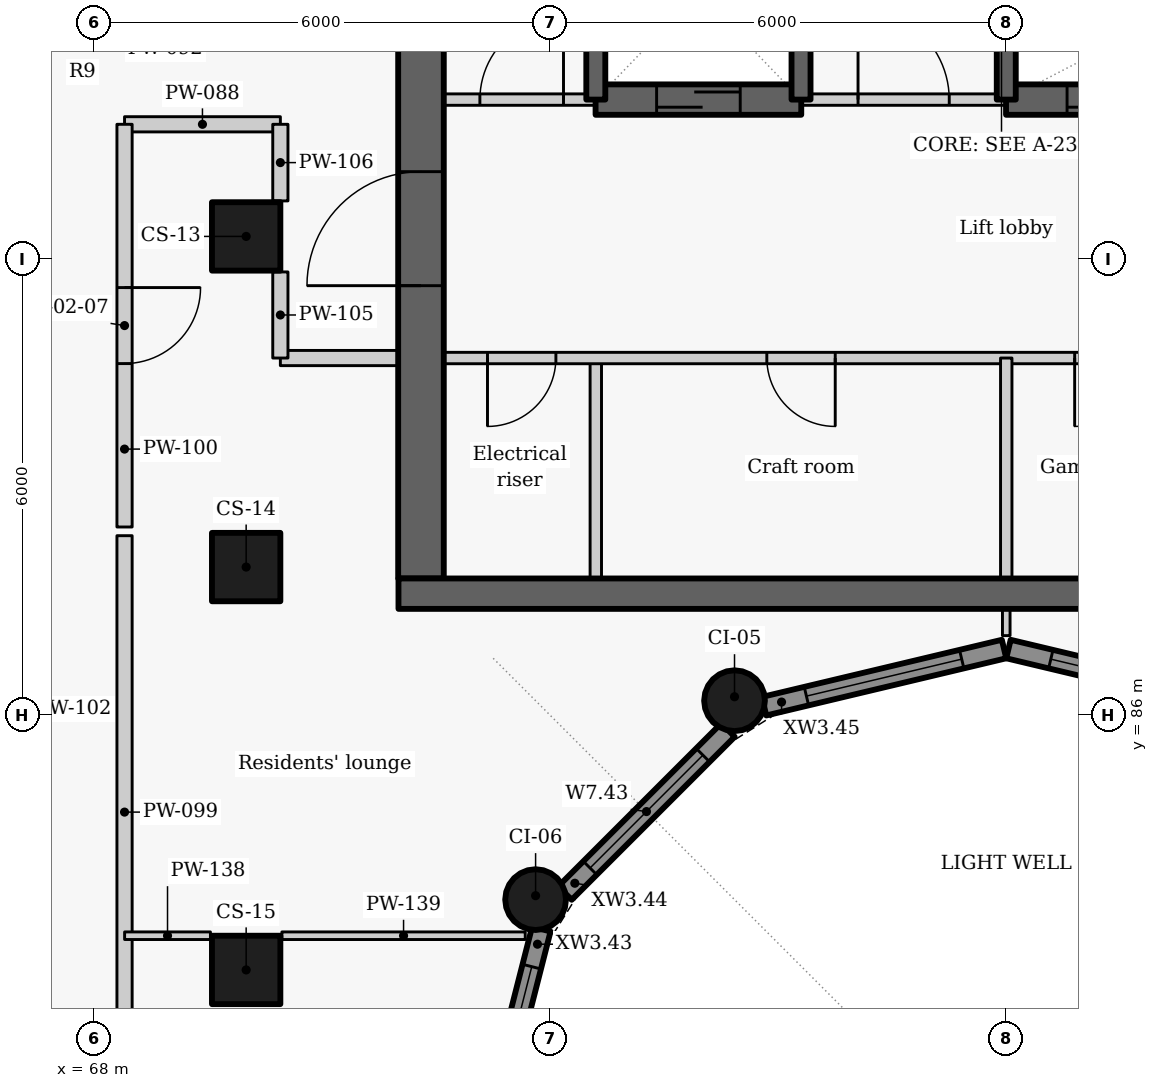
"""IFC4 building model, lengths in metres.
Left out: names, types, materials, properties, quantities, classifications, styles, units other than length and angle.
Written with IfcOpenShell. Run it as: python <this file> out.ifc"""

import sys

from ifc_helpers import new_model, si_unit, direction, frame, frame_2d, origin, origin_2d, place, context, subcontext, project, spatial, rectangle, circle, extrude, element, fill, save


model = new_model("IFC4")
c1 = context("Model", 3, precision=1e-05, world=origin(), true_north=direction((0.0, 1.0)))
c2 = subcontext(c1, "Body", "Model", "MODEL_VIEW")
j1 = project(units=[si_unit("LENGTHUNIT", "METRE"), si_unit("PLANEANGLEUNIT", "RADIAN")], contexts=[c1])
p1 = place(None, origin())
s1 = spatial("IfcSite", under=j1, at=p1, CompositionType="ELEMENT")
p2 = place(p1, origin())
s2 = spatial("IfcBuilding", under=s1, at=p2, CompositionType="ELEMENT")
p3 = place(p2, frame((0.0, 0.0, 193.2)))
s3 = spatial("IfcBuildingStorey", under=s2, at=p3, CompositionType="ELEMENT", Elevation=193.2)
for number, where, z_axis, x_axis in (
    (1, (70.0, 92.3, 0.0), (0.0, 0.0, 1.0), (0.0, -1.0, 0.0)),
    (2, (70.0, 87.95, 0.0), (0.0, 0.0, 1.0), (0.0, -1.0, 0.0)),
    (3, (70.0, 82.65, 0.0), (0.0, 0.0, 1.0), (0.0, -1.0, 0.0)),
):
    element("IfcColumn", number, at=place(p3, frame(where, z_axis=z_axis, x_axis=x_axis)), inside=s3, PredefinedType="COLUMN", context=c2, shape_type="SweptSolid", body=[
        extrude(rectangle(XDim=0.9, YDim=0.9, at=origin_2d()), origin(), (0.0, 0.0, 1.0), 3.3),
    ])
for number, where, z_axis, x_axis in (
    (4, (76.425, 86.192, 0.0), (0.0, 0.0, 1.0), (-0.866, -0.5, 0.0)),
    (5, (73.808, 83.575, 0.0), (0.0, 0.0, 1.0), (-0.5, -0.866, 0.0)),
):
    element("IfcColumn", number, at=place(p3, frame(where, z_axis=z_axis, x_axis=x_axis)), inside=s3, PredefinedType="COLUMN", context=c2, shape_type="SweptSolid", body=[
        extrude(circle(Radius=0.4, at=origin_2d()), origin(), (0.0, 0.0, 1.0), 3.3),
    ])
p4 = place(p3, frame((73.14, 80.27, 0.0), z_axis=(0.0, 0.0, 1.0), x_axis=(0.247055971283, 0.969001211069, 0.0)))
e6 = element("IfcWall", 6, at=p4, inside=s3, PredefinedType="SOLIDWALL", context=c2, shape_type="SweptSolid", body=[
    extrude(rectangle(XDim=3.01, YDim=0.25, at=frame_2d((1.505, 0.0))), origin(), (0.0, 0.0, 1.0), 2.425),
])
p5 = place(p4, frame((0.401, 0.0, 0.9)))
e7 = element("IfcOpeningElement", 7, at=p5, cuts=e6, PredefinedType="OPENING", context=c2, shape_type="SweptSolid", body=[
    extrude(rectangle(XDim=2.1, YDim=1.1, at=frame_2d((1.05, 0.55))), frame((0.0, 0.135, 0.0), z_axis=(0.0, -1.0, 0.0), x_axis=(1.0, 0.0, 0.0)), (0.0, 0.0, 1.0), 0.27),
])
p6 = place(p3, frame((74.194, 83.661, 0.0), z_axis=(0.0, 0.0, 1.0), x_axis=(0.707106781187, 0.707106781187, 0.0)))
e8 = element("IfcWall", 8, at=p6, inside=s3, PredefinedType="SOLIDWALL", context=c2, shape_type="SweptSolid", body=[
    extrude(rectangle(XDim=3.033, YDim=0.25, at=frame_2d((1.517, 0.0))), origin(), (0.0, 0.0, 1.0), 2.425),
])
p7 = place(p6, frame((0.467, 0.0, 0.9)))
e9 = element("IfcOpeningElement", 9, at=p7, cuts=e8, PredefinedType="OPENING", context=c2, shape_type="SweptSolid", body=[
    extrude(rectangle(XDim=2.1, YDim=1.1, at=frame_2d((1.05, 0.55))), frame((0.0, 0.135, 0.0), z_axis=(0.0, -1.0, 0.0), x_axis=(1.0, 0.0, 0.0)), (0.0, 0.0, 1.0), 0.27),
])
p8 = place(p3, frame((76.814, 86.119, 0.0), z_axis=(0.0, 0.0, 1.0), x_axis=(0.972773113459, 0.231759508395, 0.0)))
e10 = element("IfcWall", 10, at=p8, inside=s3, PredefinedType="SOLIDWALL", context=c2, shape_type="SweptSolid", body=[
    extrude(rectangle(XDim=3.246, YDim=0.25, at=frame_2d((1.623, 0.0))), origin(), (0.0, 0.0, 1.0), 2.425),
])
p9 = place(p8, frame((0.573, 0.0, 0.9)))
e11 = element("IfcOpeningElement", 11, at=p9, cuts=e10, PredefinedType="OPENING", context=c2, shape_type="SweptSolid", body=[
    extrude(rectangle(XDim=2.1, YDim=1.1, at=frame_2d((1.05, 0.55))), frame((0.0, 0.135, 0.0), z_axis=(0.0, -1.0, 0.0), x_axis=(1.0, 0.0, 0.0)), (0.0, 0.0, 1.0), 0.27),
])
p10 = place(p3, frame((80.029, 86.872, 0.0), z_axis=(0.0, 0.0, 1.0), x_axis=(0.972773113459, -0.231759508395, 0.0)))
e12 = element("IfcWall", 12, at=p10, inside=s3, PredefinedType="SOLIDWALL", context=c2, shape_type="SweptSolid", body=[
    extrude(rectangle(XDim=3.246, YDim=0.25, at=frame_2d((1.623, 0.0))), origin(), (0.0, 0.0, 1.0), 2.425),
])
p11 = place(p10, frame((0.573, 0.0, 0.9)))
e13 = element("IfcOpeningElement", 13, at=p11, cuts=e12, PredefinedType="OPENING", context=c2, shape_type="SweptSolid", body=[
    extrude(rectangle(XDim=2.1, YDim=1.1, at=frame_2d((1.05, 0.55))), frame((0.0, 0.135, 0.0), z_axis=(0.0, -1.0, 0.0), x_axis=(1.0, 0.0, 0.0)), (0.0, 0.0, 1.0), 0.27),
])
p12 = place(p3, frame((74.6, 87.8, 0.0), z_axis=(0.0, 0.0, 1.0), x_axis=(0.0, 1.0, 0.0)))
e14 = element("IfcWall", 14, at=p12, inside=s3, PredefinedType="PARTITIONING", context=c2, shape_type="SweptSolid", body=[
    extrude(rectangle(XDim=2.9, YDim=0.15, at=frame_2d((1.45, 0.0))), origin(), (0.0, 0.0, 1.0), 3.025),
])
p13 = place(p3, frame((85.4, 90.7, 0.0), z_axis=(0.0, 0.0, 1.0), x_axis=(-1.0, 0.0, 0.0)))
e15 = element("IfcWall", 15, at=p13, inside=s3, PredefinedType="PARTITIONING", context=c2, shape_type="SweptSolid", body=[
    extrude(rectangle(XDim=13.4, YDim=0.15, at=frame_2d((6.7, 0.0))), origin(), (0.0, 0.0, 1.0), 3.025),
])
p14 = place(p13, frame((11.325, 0.0, 0.0)))
e16 = element("IfcOpeningElement", 16, at=p14, cuts=e15, PredefinedType="OPENING", context=c2, shape_type="SweptSolid", body=[
    extrude(rectangle(XDim=0.9, YDim=2.1, at=frame_2d((0.45, 1.05))), frame((0.0, 0.085, 0.0), z_axis=(0.0, -1.0, 0.0), x_axis=(1.0, 0.0, 0.0)), (0.0, 0.0, 1.0), 0.17),
])
p15 = place(p13, frame((7.65, 0.0, 0.0)))
e17 = element("IfcOpeningElement", 17, at=p15, cuts=e15, PredefinedType="OPENING", context=c2, shape_type="SweptSolid", body=[
    extrude(rectangle(XDim=0.9, YDim=2.1, at=frame_2d((0.45, 1.05))), frame((0.0, 0.085, 0.0), z_axis=(0.0, -1.0, 0.0), x_axis=(1.0, 0.0, 0.0)), (0.0, 0.0, 1.0), 0.17),
])
p16 = place(p13, frame((3.6, 0.0, 0.0)))
e18 = element("IfcOpeningElement", 18, at=p16, cuts=e15, PredefinedType="OPENING", context=c2, shape_type="SweptSolid", body=[
    extrude(rectangle(XDim=0.9, YDim=2.1, at=frame_2d((0.45, 1.05))), frame((0.0, 0.085, 0.0), z_axis=(0.0, -1.0, 0.0), x_axis=(1.0, 0.0, 0.0)), (0.0, 0.0, 1.0), 0.17),
])
p17 = place(p13, frame((0.9, 0.0, 0.0)))
e19 = element("IfcOpeningElement", 19, at=p17, cuts=e15, PredefinedType="OPENING", context=c2, shape_type="SweptSolid", body=[
    extrude(rectangle(XDim=0.9, YDim=2.1, at=frame_2d((0.45, 1.05))), frame((0.0, 0.085, 0.0), z_axis=(0.0, -1.0, 0.0), x_axis=(1.0, 0.0, 0.0)), (0.0, 0.0, 1.0), 0.17),
])
p18 = place(p3, frame((72.3, 87.8, -0.275), z_axis=(0.0, 0.0, 1.0), x_axis=(0.0, 1.0, 0.0)))
e20 = element("IfcWall", 20, at=p18, inside=s3, PredefinedType="SHEAR", context=c2, shape_type="SweptSolid", body=[
    extrude(rectangle(XDim=9.1, YDim=0.6, at=frame_2d((4.55, 0.0))), origin(), (0.0, 0.0, 1.0), 3.3),
])
p19 = place(p18, frame((3.852, 0.0, 0.275)))
e21 = element("IfcOpeningElement", 21, at=p19, cuts=e20, PredefinedType="OPENING", context=c2, shape_type="SweptSolid", body=[
    extrude(rectangle(XDim=1.5, YDim=2.1, at=frame_2d((0.75, 1.05))), frame((0.0, 0.31, 0.0), z_axis=(0.0, -1.0, 0.0), x_axis=(1.0, 0.0, 0.0)), (0.0, 0.0, 1.0), 0.62),
])
p20 = place(p3, frame((80.0, 87.8, 0.0), z_axis=(0.0, 0.0, 1.0), x_axis=(0.0, 1.0, 0.0)))
e22 = element("IfcWall", 22, at=p20, inside=s3, PredefinedType="PARTITIONING", context=c2, shape_type="SweptSolid", body=[
    extrude(rectangle(XDim=2.9, YDim=0.15, at=frame_2d((1.45, 0.0))), origin(), (0.0, 0.0, 1.0), 3.025),
])
p21 = place(p3, frame((72.0, 94.1, 0.0), z_axis=(0.0, 0.0, 1.0), x_axis=(1.0, 0.0, 0.0)))
e23 = element("IfcWall", 23, at=p21, inside=s3, PredefinedType="PARTITIONING", context=c2, shape_type="SweptSolid", body=[
    extrude(rectangle(XDim=2.603, YDim=0.15, at=frame_2d((1.302, 0.0))), origin(), (0.0, 0.0, 1.0), 3.025),
])
p22 = place(p21, frame((1.075, 0.0, 0.0)))
e24 = element("IfcOpeningElement", 24, at=p22, cuts=e23, PredefinedType="OPENING", context=c2, shape_type="SweptSolid", body=[
    extrude(rectangle(XDim=1.1, YDim=2.1, at=frame_2d((0.55, 1.05))), frame((0.0, 0.085, 0.0), z_axis=(0.0, -1.0, 0.0), x_axis=(1.0, 0.0, 0.0)), (0.0, 0.0, 1.0), 0.17),
])
p23 = place(p3, frame((77.297, 94.1, 0.0), z_axis=(0.0, 0.0, 1.0), x_axis=(1.0, 0.0, 0.0)))
e25 = element("IfcWall", 25, at=p23, inside=s3, PredefinedType="PARTITIONING", context=c2, shape_type="SweptSolid", body=[
    extrude(rectangle(XDim=2.706, YDim=0.15, at=frame_2d((1.353, 0.0))), origin(), (0.0, 0.0, 1.0), 3.025),
])
p24 = place(p23, frame((0.753, 0.0, 0.0)))
e26 = element("IfcOpeningElement", 26, at=p24, cuts=e25, PredefinedType="OPENING", context=c2, shape_type="SweptSolid", body=[
    extrude(rectangle(XDim=1.2, YDim=2.1, at=frame_2d((0.6, 1.05))), frame((0.0, 0.085, 0.0), z_axis=(0.0, -1.0, 0.0), x_axis=(1.0, 0.0, 0.0)), (0.0, 0.0, 1.0), 0.17),
])
p25 = place(p3, frame((74.597, 94.1, -0.275), z_axis=(0.0, 0.0, 1.0), x_axis=(1.0, 0.0, 0.0)))
e27 = element("IfcWall", 27, at=p25, inside=s3, PredefinedType="SHEAR", context=c2, shape_type="SweptSolid", body=[
    extrude(rectangle(XDim=2.706, YDim=0.4, at=frame_2d((1.353, 0.0))), origin(), (0.0, 0.0, 1.0), 3.3),
])
p26 = place(p25, frame((0.803, 0.0, 0.275)))
e28 = element("IfcOpeningElement", 28, at=p26, cuts=e27, PredefinedType="OPENING", context=c2, shape_type="SweptSolid", body=[
    extrude(rectangle(XDim=1.1, YDim=2.1, at=frame_2d((0.55, 1.05))), frame((0.0, 0.21, 0.0), z_axis=(0.0, -1.0, 0.0), x_axis=(1.0, 0.0, 0.0)), (0.0, 0.0, 1.0), 0.42),
])
p27 = place(p3, frame((79.997, 94.1, -0.275), z_axis=(0.0, 0.0, 1.0), x_axis=(1.0, 0.0, 0.0)))
e29 = element("IfcWall", 29, at=p27, inside=s3, PredefinedType="SHEAR", context=c2, shape_type="SweptSolid", body=[
    extrude(rectangle(XDim=5.406, YDim=0.4, at=frame_2d((2.703, 0.0))), origin(), (0.0, 0.0, 1.0), 3.3),
])
p28 = place(p27, frame((0.803, 0.0, 0.275)))
e30 = element("IfcOpeningElement", 30, at=p28, cuts=e29, PredefinedType="OPENING", context=c2, shape_type="SweptSolid", body=[
    extrude(rectangle(XDim=1.1, YDim=2.1, at=frame_2d((0.55, 1.05))), frame((0.0, 0.21, 0.0), z_axis=(0.0, -1.0, 0.0), x_axis=(1.0, 0.0, 0.0)), (0.0, 0.0, 1.0), 0.42),
])
for number, where, z_axis, x_axis in (
    (31, (74.6, 94.1, -0.275), (0.0, 0.0, 1.0), (0.0, 1.0, 0.0)),
    (32, (77.3, 94.1, -0.275), (0.0, 0.0, 1.0), (0.0, 1.0, 0.0)),
    (33, (80.0, 94.1, -0.275), (0.0, 0.0, 1.0), (0.0, 1.0, 0.0)),
):
    element("IfcWall", number, at=place(p3, frame(where, z_axis=z_axis, x_axis=x_axis)), inside=s3, PredefinedType="SHEAR", context=c2, shape_type="SweptSolid", body=[
        extrude(rectangle(XDim=2.8, YDim=0.25, at=frame_2d((1.4, 0.0))), origin(), (0.0, 0.0, 1.0), 3.3),
    ])
p29 = place(p3, frame((68.4, 93.775, 0.0), z_axis=(0.0, 0.0, 1.0), x_axis=(1.0, 0.0, 0.0)))
e34 = element("IfcWall", 34, at=p29, inside=s3, PredefinedType="PARTITIONING", context=c2, shape_type="SweptSolid", body=[
    extrude(rectangle(XDim=2.05, YDim=0.2, at=frame_2d((1.025, 0.0))), origin(), (0.0, 0.0, 1.0), 2.505),
])
p30 = place(p3, frame((70.45, 90.7, 0.0), z_axis=(0.0, 0.0, 1.0), x_axis=(1.0, 0.0, 0.0)))
e35 = element("IfcWall", 35, at=p30, inside=s3, PredefinedType="PARTITIONING", context=c2, shape_type="SweptSolid", body=[
    extrude(rectangle(XDim=1.55, YDim=0.2, at=frame_2d((0.775, 0.0))), origin(), (0.0, 0.0, 1.0), 3.025),
])
p31 = place(p3, frame((68.4, 88.363, 0.0), z_axis=(0.0, 0.0, 1.0), x_axis=(0.0, -1.0, 0.0)))
e36 = element("IfcWall", 36, at=p31, inside=s3, PredefinedType="PARTITIONING", context=c2, shape_type="SweptSolid", body=[
    extrude(rectangle(XDim=10.486, YDim=0.2, at=frame_2d((5.243, 0.0))), origin(), (0.0, 0.0, 1.0), 3.025),
])
p32 = place(p31, frame((7.373, 0.0, 0.0)))
e37 = element("IfcOpeningElement", 37, at=p32, cuts=e36, PredefinedType="OPENING", context=c2, shape_type="SweptSolid", body=[
    extrude(rectangle(XDim=1.0, YDim=2.1, at=frame_2d((0.5, 1.05))), frame((0.0, 0.11, 0.0), z_axis=(0.0, -1.0, 0.0), x_axis=(1.0, 0.0, 0.0)), (0.0, 0.0, 1.0), 0.22),
])
p33 = place(p3, frame((68.4, 93.775, 0.0), z_axis=(0.0, 0.0, 1.0), x_axis=(0.0, -1.0, 0.0)))
e38 = element("IfcWall", 38, at=p33, inside=s3, PredefinedType="PARTITIONING", context=c2, shape_type="SweptSolid", body=[
    extrude(rectangle(XDim=5.298, YDim=0.2, at=frame_2d((2.649, 0.0))), origin(), (0.0, 0.0, 1.0), 3.025),
])
p34 = place(p33, frame((2.148, 0.0, 0.0)))
e39 = element("IfcOpeningElement", 39, at=p34, cuts=e38, PredefinedType="OPENING", context=c2, shape_type="SweptSolid", body=[
    extrude(rectangle(XDim=1.0, YDim=2.1, at=frame_2d((0.5, 1.05))), frame((0.0, 0.11, 0.0), z_axis=(0.0, -1.0, 0.0), x_axis=(1.0, 0.0, 0.0)), (0.0, 0.0, 1.0), 0.22),
])
p35 = place(p3, frame((70.45, 90.7, 0.0), z_axis=(0.0, 0.0, 1.0), x_axis=(0.0, 1.0, 0.0)))
e40 = element("IfcWall", 40, at=p35, inside=s3, PredefinedType="PARTITIONING", context=c2, shape_type="SweptSolid", body=[
    extrude(rectangle(XDim=1.133, YDim=0.2, at=frame_2d((0.566, 0.0))), origin(), (0.0, 0.0, 1.0), 3.025),
])
p36 = place(p3, frame((70.45, 92.767, 0.0), z_axis=(0.0, 0.0, 1.0), x_axis=(0.0, 1.0, 0.0)))
e41 = element("IfcWall", 41, at=p36, inside=s3, PredefinedType="PARTITIONING", context=c2, shape_type="SweptSolid", body=[
    extrude(rectangle(XDim=1.008, YDim=0.2, at=frame_2d((0.504, 0.0))), origin(), (0.0, 0.0, 1.0), 3.025),
])
p37 = place(p3, frame((80.0, 87.048, 0.0), z_axis=(0.0, 0.0, 1.0), x_axis=(0.0, 1.0, 0.0)))
e42 = element("IfcWall", 42, at=p37, inside=s3, PredefinedType="PARTITIONING", context=c2, shape_type="SweptSolid", body=[
    extrude(rectangle(XDim=0.352, YDim=0.1, at=frame_2d((0.176, 0.0))), origin(), (0.0, 0.0, 1.0), 3.025),
])
p38 = place(p3, frame((68.401, 83.1, 0.0), z_axis=(0.0, 0.0, 1.0), x_axis=(1.0, 0.0, 0.0)))
e43 = element("IfcWall", 43, at=p38, inside=s3, PredefinedType="PARTITIONING", context=c2, shape_type="SweptSolid", body=[
    extrude(rectangle(XDim=1.129, YDim=0.1, at=frame_2d((0.564, 0.0))), origin(), (0.0, 0.0, 1.0), 3.025),
])
p39 = place(p3, frame((70.47, 83.1, 0.0), z_axis=(0.0, 0.0, 1.0), x_axis=(1.0, 0.0, 0.0)))
e44 = element("IfcWall", 44, at=p39, inside=s3, PredefinedType="PARTITIONING", context=c2, shape_type="SweptSolid", body=[
    extrude(rectangle(XDim=3.202, YDim=0.1, at=frame_2d((1.601, 0.0))), origin(), (0.0, 0.0, 1.0), 3.025),
])
p40 = place(p3, frame((72.004, 87.6, -0.275), z_axis=(0.0, 0.0, 1.0), x_axis=(1.0, 0.0, 0.0)))
e45 = element("IfcWall", 45, at=p40, inside=s3, PredefinedType="SHEAR", context=c2, shape_type="SweptSolid", body=[
    extrude(rectangle(XDim=15.992, YDim=0.4, at=frame_2d((7.996, 0.0))), origin(), (0.0, 0.0, 1.0), 3.3),
])
p41 = place(p5, origin())
e46 = element("IfcWindow", 46, at=p41, inside=s3, PartitioningType="SINGLE_PANEL", PredefinedType="WINDOW", context=c2, shape_type="SweptSolid", body=[
    extrude(rectangle(XDim=2.1, YDim=1.1, at=frame_2d((1.05, 0.55))), frame((0.0, 0.03, 0.0), z_axis=(0.0, -1.0, 0.0), x_axis=(1.0, 0.0, 0.0)), (0.0, 0.0, 1.0), 0.06),
])
fill(e7, e46)
p42 = place(p7, origin())
e47 = element("IfcWindow", 47, at=p42, inside=s3, PartitioningType="SINGLE_PANEL", PredefinedType="WINDOW", context=c2, shape_type="SweptSolid", body=[
    extrude(rectangle(XDim=2.1, YDim=1.1, at=frame_2d((1.05, 0.55))), frame((0.0, 0.03, 0.0), z_axis=(0.0, -1.0, 0.0), x_axis=(1.0, 0.0, 0.0)), (0.0, 0.0, 1.0), 0.06),
])
fill(e9, e47)
p43 = place(p9, origin())
e48 = element("IfcWindow", 48, at=p43, inside=s3, PartitioningType="SINGLE_PANEL", PredefinedType="WINDOW", context=c2, shape_type="SweptSolid", body=[
    extrude(rectangle(XDim=2.1, YDim=1.1, at=frame_2d((1.05, 0.55))), frame((0.0, 0.03, 0.0), z_axis=(0.0, -1.0, 0.0), x_axis=(1.0, 0.0, 0.0)), (0.0, 0.0, 1.0), 0.06),
])
fill(e11, e48)
p44 = place(p11, origin())
e49 = element("IfcWindow", 49, at=p44, inside=s3, PartitioningType="SINGLE_PANEL", PredefinedType="WINDOW", context=c2, shape_type="SweptSolid", body=[
    extrude(rectangle(XDim=2.1, YDim=1.1, at=frame_2d((1.05, 0.55))), frame((0.0, 0.03, 0.0), z_axis=(0.0, -1.0, 0.0), x_axis=(1.0, 0.0, 0.0)), (0.0, 0.0, 1.0), 0.06),
])
fill(e13, e49)
p45 = place(p14, origin())
e50 = element("IfcDoor", 50, at=p45, inside=s3, OperationType="SINGLE_SWING_RIGHT", PredefinedType="DOOR", context=c2, shape_type="SweptSolid", body=[
    extrude(rectangle(XDim=0.9, YDim=2.1, at=frame_2d((0.45, 1.05))), frame((0.0, 0.025, 0.0), z_axis=(0.0, -1.0, 0.0), x_axis=(1.0, 0.0, 0.0)), (0.0, 0.0, 1.0), 0.05),
])
fill(e16, e50)
p46 = place(p15, origin())
e51 = element("IfcDoor", 51, at=p46, inside=s3, OperationType="SINGLE_SWING_LEFT", PredefinedType="DOOR", context=c2, shape_type="SweptSolid", body=[
    extrude(rectangle(XDim=0.9, YDim=2.1, at=frame_2d((0.45, 1.05))), frame((0.0, 0.025, 0.0), z_axis=(0.0, -1.0, 0.0), x_axis=(1.0, 0.0, 0.0)), (0.0, 0.0, 1.0), 0.05),
])
fill(e17, e51)
p47 = place(p16, origin())
e52 = element("IfcDoor", 52, at=p47, inside=s3, OperationType="SINGLE_SWING_RIGHT", PredefinedType="DOOR", context=c2, shape_type="SweptSolid", body=[
    extrude(rectangle(XDim=0.9, YDim=2.1, at=frame_2d((0.45, 1.05))), frame((0.0, 0.025, 0.0), z_axis=(0.0, -1.0, 0.0), x_axis=(1.0, 0.0, 0.0)), (0.0, 0.0, 1.0), 0.05),
])
fill(e18, e52)
p48 = place(p22, origin())
e53 = element("IfcDoor", 53, at=p48, inside=s3, OperationType="SINGLE_SWING_RIGHT", PredefinedType="DOOR", context=c2, shape_type="SweptSolid", body=[
    extrude(rectangle(XDim=1.1, YDim=2.1, at=frame_2d((0.55, 1.05))), frame((0.0, 0.025, 0.0), z_axis=(0.0, -1.0, 0.0), x_axis=(1.0, 0.0, 0.0)), (0.0, 0.0, 1.0), 0.05),
])
fill(e24, e53)
p49 = place(p26, origin())
e54 = element("IfcDoor", 54, at=p49, inside=s3, OperationType="SLIDING_TO_LEFT", PredefinedType="DOOR", context=c2, shape_type="SweptSolid", body=[
    extrude(rectangle(XDim=1.1, YDim=2.1, at=frame_2d((0.55, 1.05))), frame((0.0, 0.025, 0.0), z_axis=(0.0, -1.0, 0.0), x_axis=(1.0, 0.0, 0.0)), (0.0, 0.0, 1.0), 0.05),
])
fill(e28, e54)
p50 = place(p24, origin())
e55 = element("IfcDoor", 55, at=p50, inside=s3, OperationType="DOUBLE_DOOR_SINGLE_SWING", PredefinedType="DOOR", context=c2, shape_type="SweptSolid", body=[
    extrude(rectangle(XDim=1.2, YDim=2.1, at=frame_2d((0.6, 1.05))), frame((0.0, 0.025, 0.0), z_axis=(0.0, -1.0, 0.0), x_axis=(1.0, 0.0, 0.0)), (0.0, 0.0, 1.0), 0.05),
])
fill(e26, e55)
p51 = place(p28, origin())
e56 = element("IfcDoor", 56, at=p51, inside=s3, OperationType="SLIDING_TO_LEFT", PredefinedType="DOOR", context=c2, shape_type="SweptSolid", body=[
    extrude(rectangle(XDim=1.1, YDim=2.1, at=frame_2d((0.55, 1.05))), frame((0.0, 0.025, 0.0), z_axis=(0.0, -1.0, 0.0), x_axis=(1.0, 0.0, 0.0)), (0.0, 0.0, 1.0), 0.05),
])
fill(e30, e56)
p52 = place(p34, origin())
e57 = element("IfcDoor", 57, at=p52, inside=s3, OperationType="SINGLE_SWING_LEFT", PredefinedType="DOOR", context=c2, shape_type="SweptSolid", body=[
    extrude(rectangle(XDim=1.0, YDim=2.1, at=frame_2d((0.5, 1.05))), frame((0.0, 0.025, 0.0), z_axis=(0.0, -1.0, 0.0), x_axis=(1.0, 0.0, 0.0)), (0.0, 0.0, 1.0), 0.05),
])
fill(e39, e57)
p53 = place(p19, origin())
e58 = element("IfcDoor", 58, at=p53, inside=s3, OperationType="DOUBLE_DOOR_SINGLE_SWING", PredefinedType="DOOR", context=c2, shape_type="SweptSolid", body=[
    extrude(rectangle(XDim=1.5, YDim=2.1, at=frame_2d((0.75, 1.05))), frame((0.0, 0.025, 0.0), z_axis=(0.0, -1.0, 0.0), x_axis=(1.0, 0.0, 0.0)), (0.0, 0.0, 1.0), 0.05),
])
fill(e21, e58)
save(model, sys.argv[1])
